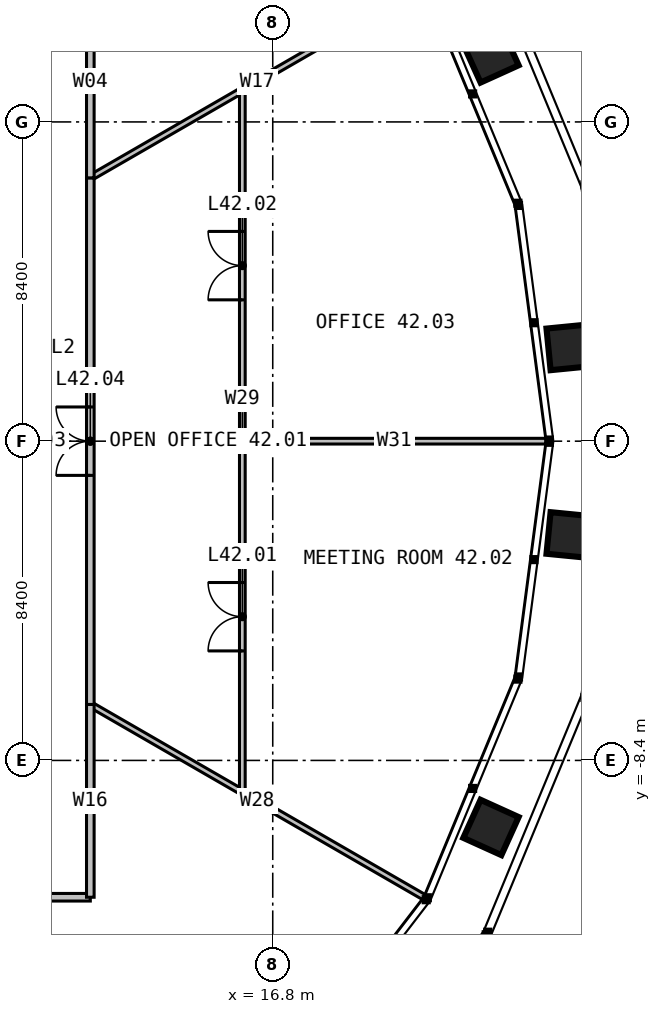
"""IFC4 building model, lengths in metres.
Left out: names, types, materials, properties, quantities, classifications, styles, units other than length and angle.
Written with IfcOpenShell. Run it as: python <this file> out.ifc"""

import sys

from ifc_helpers import new_model, si_unit, direction, frame, frame_2d, origin, place, context, subcontext, project, spatial, rectangle, extrude, element, fill, save


model = new_model("IFC4")
c1 = context("Model", 3, precision=1e-05, world=origin(), true_north=direction((0.0, 1.0)))
c2 = subcontext(c1, "Body", "Model", "MODEL_VIEW")
j1 = project(units=[si_unit("LENGTHUNIT", "METRE"), si_unit("PLANEANGLEUNIT", "RADIAN")], contexts=[c1])
p1 = place(None, origin())
s1 = spatial("IfcSite", under=j1, at=p1, CompositionType="ELEMENT")
p2 = place(p1, origin())
s2 = spatial("IfcBuilding", under=s1, at=p2, CompositionType="ELEMENT")
p3 = place(p2, frame((0.0, 0.0, 175.0)))
s3 = spatial("IfcBuildingStorey", under=s2, at=p3, CompositionType="ELEMENT", Elevation=175.0)
for number, where, z_axis, x_axis in (
    (1, (12.0, -6.928, 0.0), (0.0, 0.0, 1.0), (0.866, -0.5, 0.0)),
    (2, (12.0, 6.928, 0.0), (0.0, 0.0, 1.0), (0.866, 0.5, 0.0)),
    (3, (6.928, -12.0, 0.0), (0.0, 0.0, 1.0), (0.5, -0.866, 0.0)),
):
    element("IfcWall", number, at=place(p3, frame(where, z_axis=z_axis, x_axis=x_axis)), inside=s3, PredefinedType="PARTITIONING", context=c2, shape_type="SweptSolid", body=[
        extrude(rectangle(XDim=10.136, YDim=0.15, at=frame_2d((5.068, 0.0))), origin(), (0.0, 0.0, 1.0), 2.79),
    ])
p4 = place(p3, frame((16.0, -9.238, 0.0), z_axis=(0.0, 0.0, 1.0), x_axis=(0.0, 1.0, 0.0)))
e4 = element("IfcWall", 4, at=p4, inside=s3, PredefinedType="PARTITIONING", context=c2, shape_type="SweptSolid", body=[
    extrude(rectangle(XDim=18.475, YDim=0.15, at=frame_2d((9.238, 0.0))), origin(), (0.0, 0.0, 1.0), 2.79),
])
p5 = place(p4, frame((3.719, 0.0, 0.0)))
e5 = element("IfcOpeningElement", 5, at=p5, cuts=e4, PredefinedType="OPENING", context=c2, shape_type="SweptSolid", body=[
    extrude(rectangle(XDim=1.8, YDim=2.2, at=frame_2d((0.9, 1.1))), frame((0.0, 0.085, 0.0), z_axis=(0.0, -1.0, 0.0), x_axis=(1.0, 0.0, 0.0)), (0.0, 0.0, 1.0), 0.17),
])
p6 = place(p4, frame((12.956, 0.0, 0.0)))
e6 = element("IfcOpeningElement", 6, at=p6, cuts=e4, PredefinedType="OPENING", context=c2, shape_type="SweptSolid", body=[
    extrude(rectangle(XDim=1.8, YDim=2.2, at=frame_2d((0.9, 1.1))), frame((0.0, 0.085, 0.0), z_axis=(0.0, -1.0, 0.0), x_axis=(1.0, 0.0, 0.0)), (0.0, 0.0, 1.0), 0.17),
])
p7 = place(p3, frame((16.0, 0.0, 0.0), z_axis=(0.0, 0.0, 1.0), x_axis=(1.0, 0.0, 0.0)))
e7 = element("IfcWall", 7, at=p7, inside=s3, PredefinedType="PARTITIONING", context=c2, shape_type="SweptSolid", body=[
    extrude(rectangle(XDim=7.992, YDim=0.15, at=frame_2d((3.996, 0.0))), origin(), (0.0, 0.0, 1.0), 2.79),
])
p8 = place(p3, frame((12.0, -6.928, 0.0), z_axis=(0.0, 0.0, 1.0), x_axis=(0.0, 1.0, 0.0)))
e8 = element("IfcWall", 8, at=p8, inside=s3, PredefinedType="PARTITIONING", context=c2, shape_type="SweptSolid", body=[
    extrude(rectangle(XDim=13.856, YDim=0.2, at=frame_2d((6.928, 0.0))), origin(), (0.0, 0.0, 1.0), 3.8),
])
p9 = place(p8, frame((6.028, 0.0, 0.0)))
e9 = element("IfcOpeningElement", 9, at=p9, cuts=e8, PredefinedType="OPENING", context=c2, shape_type="SweptSolid", body=[
    extrude(rectangle(XDim=1.8, YDim=2.2, at=frame_2d((0.9, 1.1))), frame((0.0, 0.11, 0.0), z_axis=(0.0, -1.0, 0.0), x_axis=(1.0, 0.0, 0.0)), (0.0, 0.0, 1.0), 0.22),
])
p10 = place(p3, frame((12.0, 6.928, 0.0), z_axis=(0.0, 0.0, 1.0), x_axis=(0.0, 1.0, 0.0)))
e10 = element("IfcWall", 10, at=p10, inside=s3, PredefinedType="PARTITIONING", context=c2, shape_type="SweptSolid", body=[
    extrude(rectangle(XDim=5.072, YDim=0.2, at=frame_2d((2.536, 0.0))), origin(), (0.0, 0.0, 1.0), 3.8),
])
p11 = place(p3, frame((6.928, -12.0, 0.0), z_axis=(0.0, 0.0, 1.0), x_axis=(1.0, 0.0, 0.0)))
e11 = element("IfcWall", 11, at=p11, inside=s3, PredefinedType="PARTITIONING", context=c2, shape_type="SweptSolid", body=[
    extrude(rectangle(XDim=5.072, YDim=0.2, at=frame_2d((2.536, 0.0))), origin(), (0.0, 0.0, 1.0), 3.8),
])
p12 = place(p11, frame((1.636, 0.0, 0.0)))
e12 = element("IfcOpeningElement", 12, at=p12, cuts=e11, PredefinedType="OPENING", context=c2, shape_type="SweptSolid", body=[
    extrude(rectangle(XDim=1.8, YDim=2.2, at=frame_2d((0.9, 1.1))), frame((0.0, 0.11, 0.0), z_axis=(0.0, -1.0, 0.0), x_axis=(1.0, 0.0, 0.0)), (0.0, 0.0, 1.0), 0.22),
])
p13 = place(p3, frame((12.0, -12.0, 0.0), z_axis=(0.0, 0.0, 1.0), x_axis=(0.0, 1.0, 0.0)))
e13 = element("IfcWall", 13, at=p13, inside=s3, PredefinedType="PARTITIONING", context=c2, shape_type="SweptSolid", body=[
    extrude(rectangle(XDim=5.072, YDim=0.2, at=frame_2d((2.536, 0.0))), origin(), (0.0, 0.0, 1.0), 3.8),
])
p14 = place(p5, origin())
e14 = element("IfcDoor", 14, at=p14, inside=s3, OperationType="DOUBLE_DOOR_SINGLE_SWING", PredefinedType="DOOR", context=c2, shape_type="SweptSolid", body=[
    extrude(rectangle(XDim=1.8, YDim=2.2, at=frame_2d((0.9, 1.1))), frame((0.0, 0.025, 0.0), z_axis=(0.0, -1.0, 0.0), x_axis=(1.0, 0.0, 0.0)), (0.0, 0.0, 1.0), 0.05),
])
fill(e5, e14)
p15 = place(p6, origin())
e15 = element("IfcDoor", 15, at=p15, inside=s3, OperationType="DOUBLE_DOOR_SINGLE_SWING", PredefinedType="DOOR", context=c2, shape_type="SweptSolid", body=[
    extrude(rectangle(XDim=1.8, YDim=2.2, at=frame_2d((0.9, 1.1))), frame((0.0, 0.025, 0.0), z_axis=(0.0, -1.0, 0.0), x_axis=(1.0, 0.0, 0.0)), (0.0, 0.0, 1.0), 0.05),
])
fill(e6, e15)
p16 = place(p9, origin())
e16 = element("IfcDoor", 16, at=p16, inside=s3, OperationType="DOUBLE_DOOR_SINGLE_SWING", PredefinedType="DOOR", context=c2, shape_type="SweptSolid", body=[
    extrude(rectangle(XDim=1.8, YDim=2.2, at=frame_2d((0.9, 1.1))), frame((0.0, 0.025, 0.0), z_axis=(0.0, -1.0, 0.0), x_axis=(1.0, 0.0, 0.0)), (0.0, 0.0, 1.0), 0.05),
])
fill(e9, e16)
save(model, sys.argv[1])
